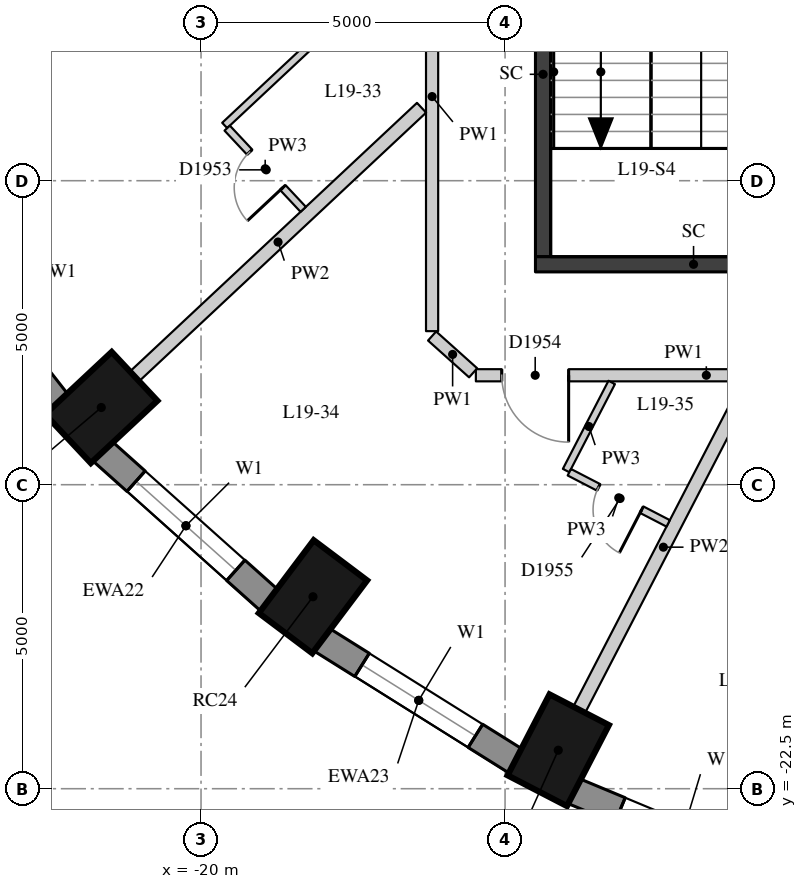
"""IFC4 building model, lengths in metres.
Left out: names, types, materials, properties, quantities, classifications, styles, units other than length and angle.
Written with IfcOpenShell. Run it as: python <this file> out.ifc"""

import sys

from ifc_helpers import new_model, si_unit, direction, frame, frame_2d, origin, origin_2d, place, context, subcontext, project, spatial, rectangle, extrude, element, fill, save


model = new_model("IFC4")
c1 = context("Model", 3, precision=1e-05, world=origin(), true_north=direction((0.0, 1.0)))
c2 = subcontext(c1, "Body", "Model", "MODEL_VIEW")
j1 = project(units=[si_unit("LENGTHUNIT", "METRE"), si_unit("PLANEANGLEUNIT", "RADIAN")], contexts=[c1])
p1 = place(None, origin())
s1 = spatial("IfcSite", under=j1, at=p1, CompositionType="ELEMENT")
p2 = place(p1, origin())
s2 = spatial("IfcBuilding", under=s1, at=p2, CompositionType="ELEMENT")
p3 = place(p2, frame((0.0, 0.0, 71.2)))
s3 = spatial("IfcBuildingStorey", under=s2, at=p3, CompositionType="ELEMENT", Elevation=71.2)
for number, where, z_axis, x_axis in (
    (1, (-21.641, -16.23, 0.0), (0.0, 0.0, 1.0), (-0.73, -0.683, 0.0)),
    (2, (-18.159, -19.343, 0.0), (0.0, 0.0, 1.0), (-0.601, -0.799, 0.0)),
    (3, (-14.125, -21.867, 0.0), (0.0, 0.0, 1.0), (-0.46, -0.888, 0.0)),
):
    element("IfcColumn", number, at=place(p3, frame(where, z_axis=z_axis, x_axis=x_axis)), inside=s3, PredefinedType="COLUMN", context=c2, shape_type="SweptSolid", body=[
        extrude(rectangle(XDim=1.5, YDim=1.1, at=origin_2d()), origin(), (0.0, 0.0, 1.0), 3.3),
    ])
p4 = place(p3, frame((-24.578, -13.328, 0.0), z_axis=(0.0, 0.0, 1.0), x_axis=(0.616661975264, -0.787228053529, 0.0)))
e4 = element("IfcWall", 4, at=p4, inside=s3, PredefinedType="SOLIDWALL", context=c2, shape_type="SweptSolid", body=[
    extrude(rectangle(XDim=3.61, YDim=0.45, at=frame_2d((1.805, 0.0))), origin(), (0.0, 0.0, 1.0), 3.02),
])
p5 = place(p4, frame((0.705, 0.0, 0.4)))
e5 = element("IfcOpeningElement", 5, at=p5, cuts=e4, PredefinedType="OPENING", context=c2, shape_type="SweptSolid", body=[
    extrude(rectangle(XDim=2.2, YDim=1.75, at=frame_2d((1.1, 0.875))), frame((0.0, 0.235, 0.0), z_axis=(0.0, -1.0, 0.0), x_axis=(1.0, 0.0, 0.0)), (0.0, 0.0, 1.0), 0.47),
])
p6 = place(p3, frame((-21.627, -16.943, 0.0), z_axis=(0.0, 0.0, 1.0), x_axis=(0.745526233716, -0.66647628228, 0.0)))
e6 = element("IfcWall", 6, at=p6, inside=s3, PredefinedType="SOLIDWALL", context=c2, shape_type="SweptSolid", body=[
    extrude(rectangle(XDim=3.697, YDim=0.45, at=frame_2d((1.848, 0.0))), origin(), (0.0, 0.0, 1.0), 3.02),
])
p7 = place(p6, frame((0.749, 0.0, 0.4)))
e7 = element("IfcOpeningElement", 7, at=p7, cuts=e6, PredefinedType="OPENING", context=c2, shape_type="SweptSolid", body=[
    extrude(rectangle(XDim=2.2, YDim=1.75, at=frame_2d((1.1, 0.875))), frame((0.0, 0.235, 0.0), z_axis=(0.0, -1.0, 0.0), x_axis=(1.0, 0.0, 0.0)), (0.0, 0.0, 1.0), 0.47),
])
p8 = place(p3, frame((-18.023, -20.044, 0.0), z_axis=(0.0, 0.0, 1.0), x_axis=(0.847635480093, -0.530579016629, 0.0)))
e8 = element("IfcWall", 8, at=p8, inside=s3, PredefinedType="SOLIDWALL", context=c2, shape_type="SweptSolid", body=[
    extrude(rectangle(XDim=3.782, YDim=0.45, at=frame_2d((1.891, 0.0))), origin(), (0.0, 0.0, 1.0), 3.02),
])
p9 = place(p8, frame((0.791, 0.0, 0.4)))
e9 = element("IfcOpeningElement", 9, at=p9, cuts=e8, PredefinedType="OPENING", context=c2, shape_type="SweptSolid", body=[
    extrude(rectangle(XDim=2.2, YDim=1.75, at=frame_2d((1.1, 0.875))), frame((0.0, 0.235, 0.0), z_axis=(0.0, -1.0, 0.0), x_axis=(1.0, 0.0, 0.0)), (0.0, 0.0, 1.0), 0.47),
])
p10 = place(p3, frame((-13.875, -22.537, 0.0), z_axis=(0.0, 0.0, 1.0), x_axis=(0.923031964282, -0.384723267966, 0.0)))
e10 = element("IfcWall", 10, at=p10, inside=s3, PredefinedType="SOLIDWALL", context=c2, shape_type="SweptSolid", body=[
    extrude(rectangle(XDim=3.856, YDim=0.45, at=frame_2d((1.928, 0.0))), origin(), (0.0, 0.0, 1.0), 3.02),
])
p11 = place(p10, frame((0.828, 0.0, 0.4)))
e11 = element("IfcOpeningElement", 11, at=p11, cuts=e10, PredefinedType="OPENING", context=c2, shape_type="SweptSolid", body=[
    extrude(rectangle(XDim=2.2, YDim=1.75, at=frame_2d((1.1, 0.875))), frame((0.0, 0.235, 0.0), z_axis=(0.0, -1.0, 0.0), x_axis=(1.0, 0.0, 0.0)), (0.0, 0.0, 1.0), 0.47),
])
p12 = place(p3, frame((-14.375, -13.75, -0.28), z_axis=(0.0, 0.0, 1.0), x_axis=(0.0, 1.0, 0.0)))
e12 = element("IfcWall", 12, at=p12, inside=s3, PredefinedType="SHEAR", context=c2, shape_type="SweptSolid", body=[
    extrude(rectangle(XDim=6.0, YDim=0.25, at=frame_2d((3.0, 0.0))), origin(), (0.0, 0.0, 1.0), 3.3),
])
p13 = place(p3, frame((-14.5, -13.875, -0.28), z_axis=(0.0, 0.0, 1.0), x_axis=(1.0, 0.0, 0.0)))
e13 = element("IfcWall", 13, at=p13, inside=s3, PredefinedType="SHEAR", context=c2, shape_type="SweptSolid", body=[
    extrude(rectangle(XDim=5.2, YDim=0.25, at=frame_2d((2.6, 0.0))), origin(), (0.0, 0.0, 1.0), 3.3),
])
p14 = place(p3, frame((-7.9, -15.7, 0.0), z_axis=(0.0, 0.0, 1.0), x_axis=(-1.0, 0.0, 0.0)))
e14 = element("IfcWall", 14, at=p14, inside=s3, PredefinedType="PARTITIONING", context=c2, shape_type="SweptSolid", body=[
    extrude(rectangle(XDim=7.58, YDim=0.2, at=frame_2d((3.79, 0.0))), origin(), (0.0, 0.0, 1.0), 3.02),
])
p15 = place(p14, frame((6.054, 0.0, 0.0)))
e15 = element("IfcOpeningElement", 15, at=p15, cuts=e14, PredefinedType="OPENING", context=c2, shape_type="SweptSolid", body=[
    extrude(rectangle(XDim=1.1, YDim=2.1, at=frame_2d((0.55, 1.05))), frame((0.0, 0.11, 0.0), z_axis=(0.0, -1.0, 0.0), x_axis=(1.0, 0.0, 0.0)), (0.0, 0.0, 1.0), 0.22),
])
p16 = place(p14, frame((1.377, 0.0, 0.0)))
e16 = element("IfcOpeningElement", 16, at=p16, cuts=e14, PredefinedType="OPENING", context=c2, shape_type="SweptSolid", body=[
    extrude(rectangle(XDim=1.0, YDim=2.1, at=frame_2d((0.5, 1.05))), frame((0.0, 0.11, 0.0), z_axis=(0.0, -1.0, 0.0), x_axis=(1.0, 0.0, 0.0)), (0.0, 0.0, 1.0), 0.22),
])
p17 = place(p3, frame((-15.525, -15.66, 0.0), z_axis=(0.0, 0.0, 1.0), x_axis=(-0.744684787626, 0.667416337138, 0.0)))
e17 = element("IfcWall", 17, at=p17, inside=s3, PredefinedType="PARTITIONING", context=c2, shape_type="SweptSolid", body=[
    extrude(rectangle(XDim=0.907, YDim=0.2, at=frame_2d((0.453, 0.0))), origin(), (0.0, 0.0, 1.0), 3.02),
])
p18 = place(p3, frame((-16.2, -14.974, 0.0), z_axis=(0.0, 0.0, 1.0), x_axis=(0.0, 1.0, 0.0)))
e18 = element("IfcWall", 18, at=p18, inside=s3, PredefinedType="PARTITIONING", context=c2, shape_type="SweptSolid", body=[
    extrude(rectangle(XDim=7.716, YDim=0.2, at=frame_2d((3.858, 0.0))), origin(), (0.0, 0.0, 1.0), 3.02),
])
p19 = place(p3, frame((-21.093, -15.718, 0.0), z_axis=(0.0, 0.0, 1.0), x_axis=(0.730096357883, 0.68334420917, 0.0)))
e19 = element("IfcWall", 19, at=p19, inside=s3, PredefinedType="PARTITIONING", context=c2, shape_type="SweptSolid", body=[
    extrude(rectangle(XDim=6.465, YDim=0.22, at=frame_2d((3.232, 0.0))), origin(), (0.0, 0.0, 1.0), 3.02),
])
p20 = place(p3, frame((-13.78, -21.201, 0.0), z_axis=(0.0, 0.0, 1.0), x_axis=(0.459689820266, 0.888079539875, 0.0)))
e20 = element("IfcWall", 20, at=p20, inside=s3, PredefinedType="PARTITIONING", context=c2, shape_type="SweptSolid", body=[
    extrude(rectangle(XDim=6.021, YDim=0.22, at=frame_2d((3.011, 0.0))), origin(), (0.0, 0.0, 1.0), 3.02),
])
p21 = place(p3, frame((-16.329, -8.52, 0.0), z_axis=(0.0, 0.0, 1.0), x_axis=(-0.730102689118, -0.68333744471, 0.0)))
e21 = element("IfcWall", 21, at=p21, inside=s3, PredefinedType="PARTITIONING", context=c2, shape_type="SweptSolid", body=[
    extrude(rectangle(XDim=4.495, YDim=0.12, at=frame_2d((2.248, 0.0))), origin(), (0.0, 0.0, 1.0), 3.02),
])
p22 = place(p3, frame((-13.246, -15.818, 0.0), z_axis=(0.0, 0.0, 1.0), x_axis=(-0.459675202516, -0.888087106196, 0.0)))
e22 = element("IfcWall", 22, at=p22, inside=s3, PredefinedType="PARTITIONING", context=c2, shape_type="SweptSolid", body=[
    extrude(rectangle(XDim=1.632, YDim=0.12, at=frame_2d((0.816, 0.0))), origin(), (0.0, 0.0, 1.0), 3.02),
])
p23 = place(p3, frame((-19.57, -11.635, 0.0), z_axis=(0.0, 0.0, 1.0), x_axis=(0.683306289544, -0.730131847456, 0.0)))
e23 = element("IfcWall", 23, at=p23, inside=s3, PredefinedType="PARTITIONING", context=c2, shape_type="SweptSolid", body=[
    extrude(rectangle(XDim=1.83, YDim=0.12, at=frame_2d((0.915, 0.0))), origin(), (0.0, 0.0, 1.0), 3.02),
])
p24 = place(p23, frame((0.54, 0.0, 0.0)))
e24 = element("IfcOpeningElement", 24, at=p24, cuts=e23, PredefinedType="OPENING", context=c2, shape_type="SweptSolid", body=[
    extrude(rectangle(XDim=0.8, YDim=2.1, at=frame_2d((0.4, 1.05))), frame((0.0, 0.07, 0.0), z_axis=(0.0, -1.0, 0.0), x_axis=(1.0, 0.0, 0.0)), (0.0, 0.0, 1.0), 0.14),
])
p25 = place(p3, frame((-13.943, -17.295, 0.0), z_axis=(0.0, 0.0, 1.0), x_axis=(0.888151937069, -0.459549928387, 0.0)))
e25 = element("IfcWall", 25, at=p25, inside=s3, PredefinedType="PARTITIONING", context=c2, shape_type="SweptSolid", body=[
    extrude(rectangle(XDim=1.83, YDim=0.12, at=frame_2d((0.915, 0.0))), origin(), (0.0, 0.0, 1.0), 3.02),
])
p26 = place(p25, frame((0.54, 0.0, 0.0)))
e26 = element("IfcOpeningElement", 26, at=p26, cuts=e25, PredefinedType="OPENING", context=c2, shape_type="SweptSolid", body=[
    extrude(rectangle(XDim=0.8, YDim=2.1, at=frame_2d((0.4, 1.05))), frame((0.0, 0.07, 0.0), z_axis=(0.0, -1.0, 0.0), x_axis=(1.0, 0.0, 0.0)), (0.0, 0.0, 1.0), 0.14),
])
p27 = place(p7, origin())
e27 = element("IfcWindow", 27, at=p27, inside=s3, PartitioningType="SINGLE_PANEL", PredefinedType="WINDOW", context=c2, shape_type="SweptSolid", body=[
    extrude(rectangle(XDim=2.2, YDim=1.75, at=frame_2d((1.1, 0.875))), frame((0.0, 0.035, 0.0), z_axis=(0.0, -1.0, 0.0), x_axis=(1.0, 0.0, 0.0)), (0.0, 0.0, 1.0), 0.06),
])
fill(e7, e27)
p28 = place(p9, origin())
e28 = element("IfcWindow", 28, at=p28, inside=s3, PartitioningType="SINGLE_PANEL", PredefinedType="WINDOW", context=c2, shape_type="SweptSolid", body=[
    extrude(rectangle(XDim=2.2, YDim=1.75, at=frame_2d((1.1, 0.875))), frame((0.0, 0.035, 0.0), z_axis=(0.0, -1.0, 0.0), x_axis=(1.0, 0.0, 0.0)), (0.0, 0.0, 1.0), 0.06),
])
fill(e9, e28)
p29 = place(p11, origin())
e29 = element("IfcWindow", 29, at=p29, inside=s3, PartitioningType="SINGLE_PANEL", PredefinedType="WINDOW", context=c2, shape_type="SweptSolid", body=[
    extrude(rectangle(XDim=2.2, YDim=1.75, at=frame_2d((1.1, 0.875))), frame((0.0, 0.035, 0.0), z_axis=(0.0, -1.0, 0.0), x_axis=(1.0, 0.0, 0.0)), (0.0, 0.0, 1.0), 0.06),
])
fill(e11, e29)
p30 = place(p24, origin())
e30 = element("IfcDoor", 30, at=p30, inside=s3, OperationType="SINGLE_SWING_LEFT", PredefinedType="DOOR", context=c2, shape_type="SweptSolid", body=[
    extrude(rectangle(XDim=0.8, YDim=2.1, at=frame_2d((0.4, 1.05))), frame((0.0, 0.025, 0.0), z_axis=(0.0, -1.0, 0.0), x_axis=(1.0, 0.0, 0.0)), (0.0, 0.0, 1.0), 0.05),
])
fill(e24, e30)
p31 = place(p15, origin())
e31 = element("IfcDoor", 31, at=p31, inside=s3, OperationType="SINGLE_SWING_LEFT", PredefinedType="DOOR", context=c2, shape_type="SweptSolid", body=[
    extrude(rectangle(XDim=1.1, YDim=2.1, at=frame_2d((0.55, 1.05))), frame((0.0, 0.025, 0.0), z_axis=(0.0, -1.0, 0.0), x_axis=(1.0, 0.0, 0.0)), (0.0, 0.0, 1.0), 0.05),
])
fill(e15, e31)
p32 = place(p26, origin())
e32 = element("IfcDoor", 32, at=p32, inside=s3, OperationType="SINGLE_SWING_LEFT", PredefinedType="DOOR", context=c2, shape_type="SweptSolid", body=[
    extrude(rectangle(XDim=0.8, YDim=2.1, at=frame_2d((0.4, 1.05))), frame((0.0, 0.025, 0.0), z_axis=(0.0, -1.0, 0.0), x_axis=(1.0, 0.0, 0.0)), (0.0, 0.0, 1.0), 0.05),
])
fill(e26, e32)
save(model, sys.argv[1])
